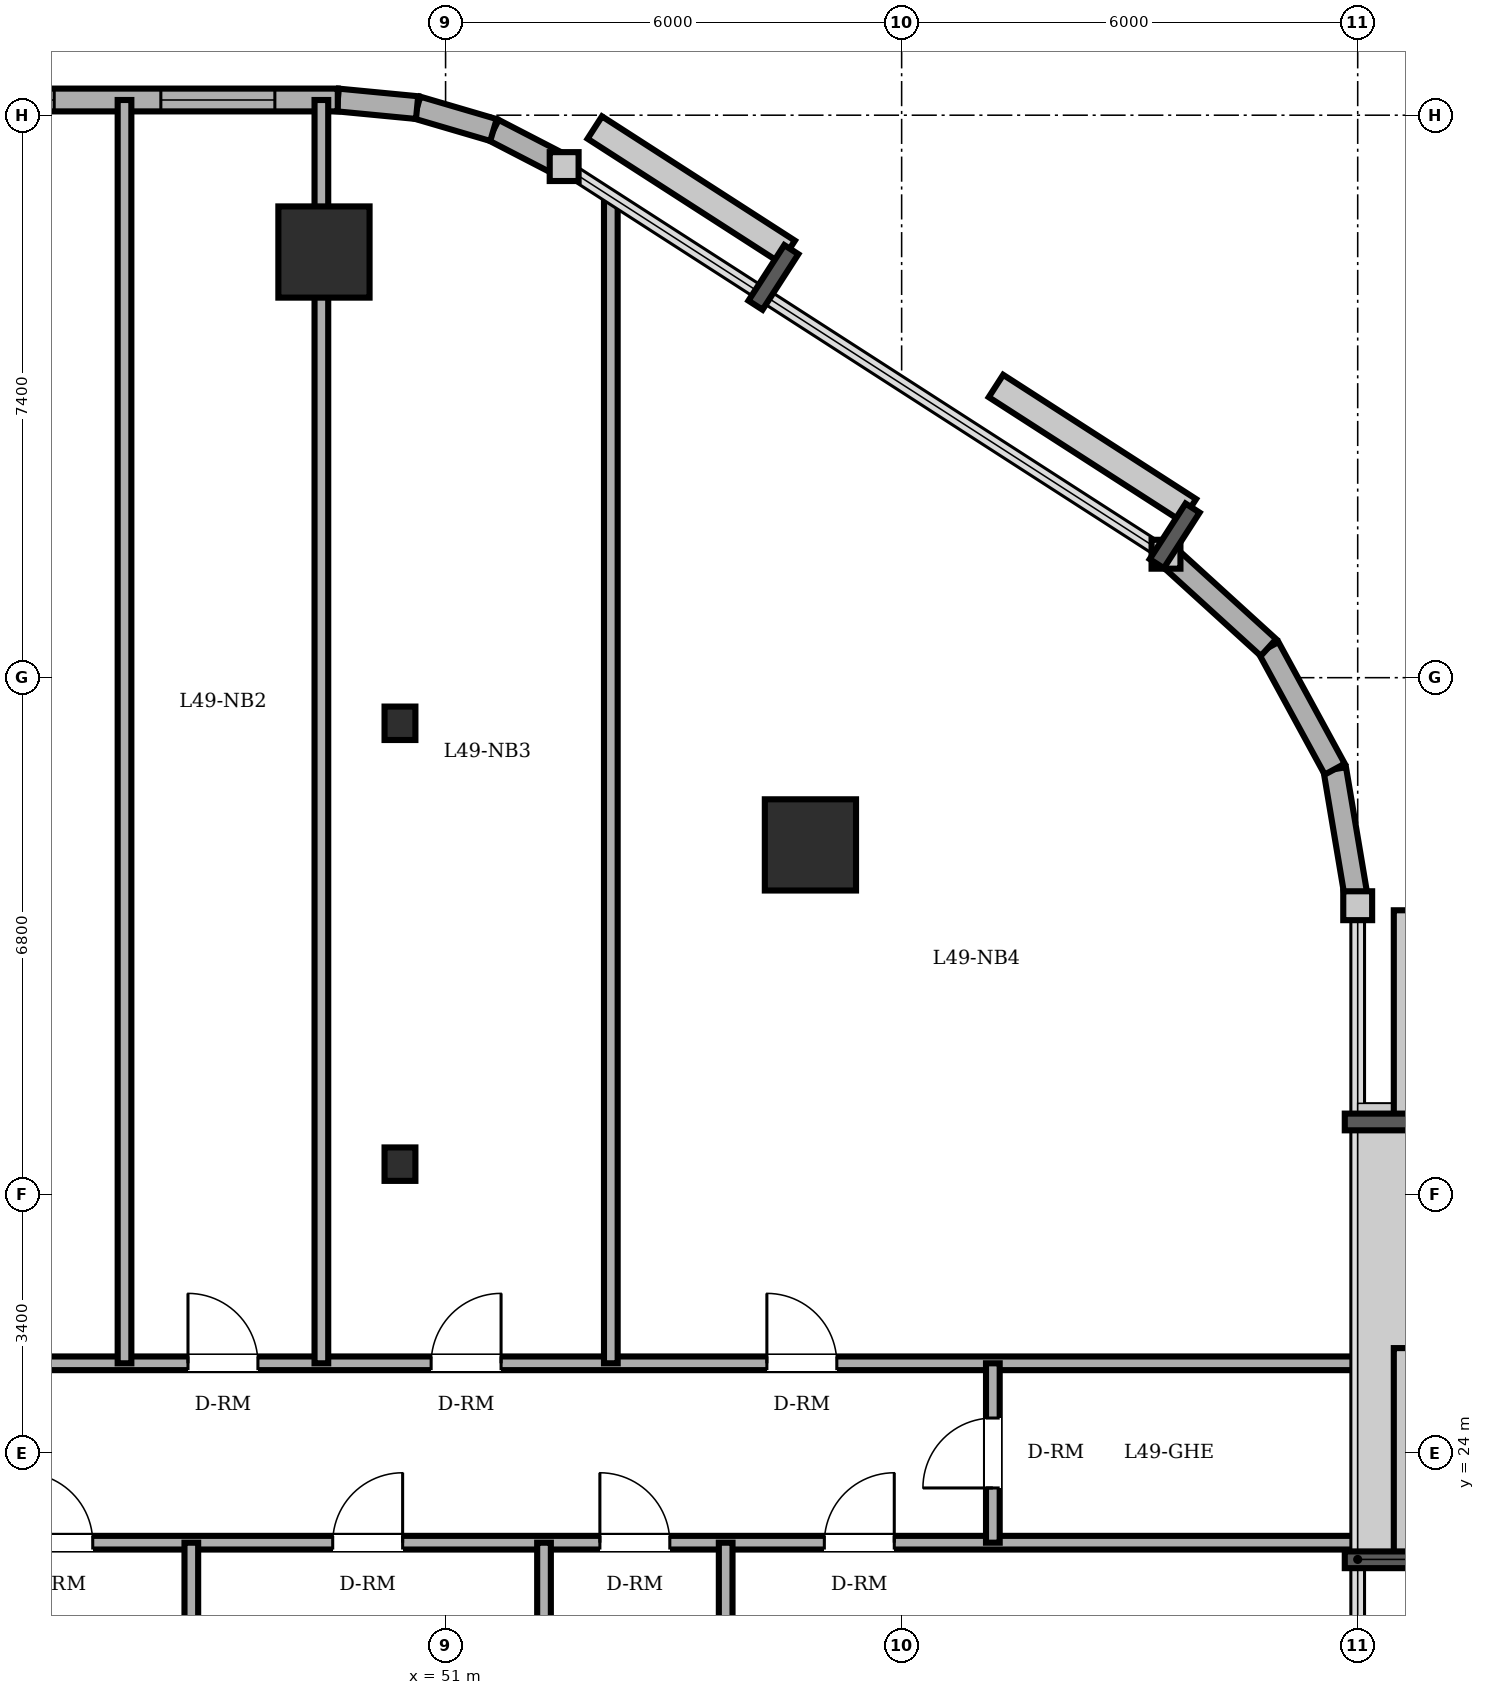
"""IFC4 building model, lengths in metres.
Left out: names, types, materials, properties, quantities, classifications, styles, units other than length and angle.
Written with IfcOpenShell. Run it as: python <this file> out.ifc"""

import sys

from ifc_helpers import new_model, si_unit, direction, frame, frame_2d, origin, origin_2d, place, context, subcontext, project, spatial, rectangle, circle, i_section, extrude, element, fill, save


model = new_model("IFC4")
c1 = context("Model", 3, precision=1e-05, world=origin(), true_north=direction((0.0, 1.0)))
c2 = subcontext(c1, "Body", "Model", "MODEL_VIEW")
j1 = project(units=[si_unit("LENGTHUNIT", "METRE"), si_unit("PLANEANGLEUNIT", "RADIAN")], contexts=[c1])
p1 = place(None, origin())
s1 = spatial("IfcSite", under=j1, at=p1, CompositionType="ELEMENT")
p2 = place(p1, origin())
s2 = spatial("IfcBuilding", under=s1, at=p2, CompositionType="ELEMENT")
p3 = place(p2, frame((0.0, 0.0, 187.0)))
s3 = spatial("IfcBuildingStorey", under=s2, at=p3, CompositionType="ELEMENT", Elevation=187.0)
for number, where, z_axis, x_axis in (
    (1, (55.8, 32.0, 0.0), (0.0, 0.0, 1.0), (1.0, 0.0, 0.0)),
    (2, (49.4, 39.8, 0.0), (0.0, 0.0, 1.0), (1.0, 0.0, 0.0)),
):
    element("IfcColumn", number, at=place(p3, frame(where, z_axis=z_axis, x_axis=x_axis)), inside=s3, PredefinedType="COLUMN", context=c2, shape_type="SweptSolid", body=[
        extrude(circle(Radius=0.6, at=origin_2d()), origin(), (0.0, 0.0, 1.0), 3.6),
    ])
for number, where, z_axis, x_axis in (
    (3, (50.4, 27.8, 0.0), (0.0, 0.0, 1.0), (1.0, 0.0, 0.0)),
    (4, (50.4, 33.6, 0.0), (0.0, 0.0, 1.0), (1.0, 0.0, 0.0)),
):
    element("IfcColumn", number, at=place(p3, frame(where, z_axis=z_axis, x_axis=x_axis)), inside=s3, PredefinedType="COLUMN", context=c2, shape_type="SweptSolid", body=[
        extrude(i_section(OverallWidth=0.406, OverallDepth=0.44, WebThickness=0.024, FlangeThickness=0.039, FilletRadius=0.015, at=origin_2d()), origin(), (0.0, 0.0, 1.0), 3.6),
    ])
p4 = place(p3, frame((63.0, 31.2, 0.0), z_axis=(0.0, 0.0, 1.0), x_axis=(-0.165724081207, 0.986172159873, 0.0)))
e5 = element("IfcWall", 5, at=p4, inside=s3, PredefinedType="SOLIDWALL", context=c2, shape_type="SweptSolid", body=[
    extrude(rectangle(XDim=1.822, YDim=0.3, at=frame_2d((0.911, 0.0))), origin(), (0.0, 0.0, 1.0), 3.36),
])
p5 = place(p3, frame((62.698, 32.997, 0.0), z_axis=(0.0, 0.0, 1.0), x_axis=(-0.478608030646, 0.878028674362, 0.0)))
e6 = element("IfcWall", 6, at=p5, inside=s3, PredefinedType="SOLIDWALL", context=c2, shape_type="SweptSolid", body=[
    extrude(rectangle(XDim=1.822, YDim=0.3, at=frame_2d((0.911, 0.0))), origin(), (0.0, 0.0, 1.0), 3.36),
])
p6 = place(p3, frame((61.826, 34.597, 0.0), z_axis=(0.0, 0.0, 1.0), x_axis=(-0.73947929393, 0.673179302897, 0.0)))
e7 = element("IfcWall", 7, at=p6, inside=s3, PredefinedType="SOLIDWALL", context=c2, shape_type="SweptSolid", body=[
    extrude(rectangle(XDim=1.823, YDim=0.3, at=frame_2d((0.911, 0.0))), origin(), (0.0, 0.0, 1.0), 3.36),
])
p7 = place(p3, frame((52.56, 40.924, 0.0), z_axis=(0.0, 0.0, 1.0), x_axis=(-0.888283247196, 0.459296062198, 0.0)))
e8 = element("IfcWall", 8, at=p7, inside=s3, PredefinedType="SOLIDWALL", context=c2, shape_type="SweptSolid", body=[
    extrude(rectangle(XDim=1.047, YDim=0.3, at=frame_2d((0.523, 0.0))), origin(), (0.0, 0.0, 1.0), 3.36),
])
p8 = place(p3, frame((51.63, 41.405, 0.0), z_axis=(0.0, 0.0, 1.0), x_axis=(-0.959528674476, 0.281610942363, 0.0)))
e9 = element("IfcWall", 9, at=p8, inside=s3, PredefinedType="SOLIDWALL", context=c2, shape_type="SweptSolid", body=[
    extrude(rectangle(XDim=1.047, YDim=0.3, at=frame_2d((0.524, 0.0))), origin(), (0.0, 0.0, 1.0), 3.36),
])
p9 = place(p3, frame((50.625, 41.7, 0.0), z_axis=(0.0, 0.0, 1.0), x_axis=(-0.995426089968, 0.095534807324, 0.0)))
e10 = element("IfcWall", 10, at=p9, inside=s3, PredefinedType="SOLIDWALL", context=c2, shape_type="SweptSolid", body=[
    extrude(rectangle(XDim=1.048, YDim=0.3, at=frame_2d((0.524, 0.0))), origin(), (0.0, 0.0, 1.0), 3.36),
])
p10 = place(p3, frame((49.582, 41.8, 0.0), z_axis=(0.0, 0.0, 1.0), x_axis=(-1.0, 0.0, 0.0)))
e11 = element("IfcWall", 11, at=p10, inside=s3, PredefinedType="SOLIDWALL", context=c2, shape_type="SweptSolid", body=[
    extrude(rectangle(XDim=30.282, YDim=0.3, at=frame_2d((15.141, 0.0))), origin(), (0.0, 0.0, 1.0), 3.36),
])
p11 = place(p10, frame((15.707, 0.0, 0.0)))
e12 = element("IfcOpeningElement", 12, at=p11, cuts=e11, PredefinedType="OPENING", context=c2, shape_type="SweptSolid", body=[
    extrude(rectangle(XDim=0.95, YDim=2.2, at=frame_2d((0.475, 1.1))), frame((0.0, 0.16, 0.0), z_axis=(0.0, -1.0, 0.0), x_axis=(1.0, 0.0, 0.0)), (0.0, 0.0, 1.0), 0.32),
])
p12 = place(p10, frame((0.828, 0.0, 0.85)))
e13 = element("IfcOpeningElement", 13, at=p12, cuts=e11, PredefinedType="OPENING", context=c2, shape_type="SweptSolid", body=[
    extrude(rectangle(XDim=1.5, YDim=1.55, at=frame_2d((0.75, 0.775))), frame((0.0, 0.16, 0.0), z_axis=(0.0, -1.0, 0.0), x_axis=(1.0, 0.0, 0.0)), (0.0, 0.0, 1.0), 0.32),
])
p13 = place(p10, frame((3.731, 0.0, 0.85)))
e14 = element("IfcOpeningElement", 14, at=p13, cuts=e11, PredefinedType="OPENING", context=c2, shape_type="SweptSolid", body=[
    extrude(rectangle(XDim=1.5, YDim=1.55, at=frame_2d((0.75, 0.775))), frame((0.0, 0.16, 0.0), z_axis=(0.0, -1.0, 0.0), x_axis=(1.0, 0.0, 0.0)), (0.0, 0.0, 1.0), 0.32),
])
p14 = place(p10, frame((5.407, 0.0, 0.85)))
e15 = element("IfcOpeningElement", 15, at=p14, cuts=e11, PredefinedType="OPENING", context=c2, shape_type="SweptSolid", body=[
    extrude(rectangle(XDim=1.5, YDim=1.55, at=frame_2d((0.75, 0.775))), frame((0.0, 0.16, 0.0), z_axis=(0.0, -1.0, 0.0), x_axis=(1.0, 0.0, 0.0)), (0.0, 0.0, 1.0), 0.32),
])
p15 = place(p10, frame((10.399, 0.0, 0.85)))
e16 = element("IfcOpeningElement", 16, at=p15, cuts=e11, PredefinedType="OPENING", context=c2, shape_type="SweptSolid", body=[
    extrude(rectangle(XDim=1.5, YDim=1.55, at=frame_2d((0.75, 0.775))), frame((0.0, 0.16, 0.0), z_axis=(0.0, -1.0, 0.0), x_axis=(1.0, 0.0, 0.0)), (0.0, 0.0, 1.0), 0.32),
])
p16 = place(p10, frame((13.715, 0.0, 0.85)))
e17 = element("IfcOpeningElement", 17, at=p16, cuts=e11, PredefinedType="OPENING", context=c2, shape_type="SweptSolid", body=[
    extrude(rectangle(XDim=1.5, YDim=1.55, at=frame_2d((0.75, 0.775))), frame((0.0, 0.16, 0.0), z_axis=(0.0, -1.0, 0.0), x_axis=(1.0, 0.0, 0.0)), (0.0, 0.0, 1.0), 0.32),
])
p17 = place(p10, frame((18.932, 0.0, 0.85)))
e18 = element("IfcOpeningElement", 18, at=p17, cuts=e11, PredefinedType="OPENING", context=c2, shape_type="SweptSolid", body=[
    extrude(rectangle(XDim=1.5, YDim=1.55, at=frame_2d((0.75, 0.775))), frame((0.0, 0.16, 0.0), z_axis=(0.0, -1.0, 0.0), x_axis=(1.0, 0.0, 0.0)), (0.0, 0.0, 1.0), 0.32),
])
p18 = place(p10, frame((22.532, 0.0, 0.85)))
e19 = element("IfcOpeningElement", 19, at=p18, cuts=e11, PredefinedType="OPENING", context=c2, shape_type="SweptSolid", body=[
    extrude(rectangle(XDim=1.5, YDim=1.55, at=frame_2d((0.75, 0.775))), frame((0.0, 0.16, 0.0), z_axis=(0.0, -1.0, 0.0), x_axis=(1.0, 0.0, 0.0)), (0.0, 0.0, 1.0), 0.32),
])
p19 = place(p10, frame((25.882, 0.0, 0.85)))
e20 = element("IfcOpeningElement", 20, at=p19, cuts=e11, PredefinedType="OPENING", context=c2, shape_type="SweptSolid", body=[
    extrude(rectangle(XDim=1.5, YDim=1.55, at=frame_2d((0.75, 0.775))), frame((0.0, 0.16, 0.0), z_axis=(0.0, -1.0, 0.0), x_axis=(1.0, 0.0, 0.0)), (0.0, 0.0, 1.0), 0.32),
])
p20 = place(p10, frame((27.532, 0.0, 0.85)))
e21 = element("IfcOpeningElement", 21, at=p20, cuts=e11, PredefinedType="OPENING", context=c2, shape_type="SweptSolid", body=[
    extrude(rectangle(XDim=1.5, YDim=1.55, at=frame_2d((0.75, 0.775))), frame((0.0, 0.16, 0.0), z_axis=(0.0, -1.0, 0.0), x_axis=(1.0, 0.0, 0.0)), (0.0, 0.0, 1.0), 0.32),
])
p21 = place(p3, frame((41.75, 22.82, 0.0), z_axis=(0.0, 0.0, 1.0), x_axis=(1.0, 0.0, 0.0)))
e22 = element("IfcWall", 22, at=p21, inside=s3, PredefinedType="PARTITIONING", context=c2, shape_type="SweptSolid", body=[
    extrude(rectangle(XDim=21.25, YDim=0.18, at=frame_2d((10.625, 0.0))), origin(), (0.0, 0.0, 1.0), 3.36),
])
p22 = place(p21, frame((3.688, 0.0, 0.0)))
e23 = element("IfcOpeningElement", 23, at=p22, cuts=e22, PredefinedType="OPENING", context=c2, shape_type="SweptSolid", body=[
    extrude(rectangle(XDim=0.92, YDim=2.1, at=frame_2d((0.46, 1.05))), frame((0.0, 0.1, 0.0), z_axis=(0.0, -1.0, 0.0), x_axis=(1.0, 0.0, 0.0)), (0.0, 0.0, 1.0), 0.2),
])
p23 = place(p21, frame((7.765, 0.0, 0.0)))
e24 = element("IfcOpeningElement", 24, at=p23, cuts=e22, PredefinedType="OPENING", context=c2, shape_type="SweptSolid", body=[
    extrude(rectangle(XDim=0.92, YDim=2.1, at=frame_2d((0.46, 1.05))), frame((0.0, 0.1, 0.0), z_axis=(0.0, -1.0, 0.0), x_axis=(1.0, 0.0, 0.0)), (0.0, 0.0, 1.0), 0.2),
])
p24 = place(p21, frame((11.28, 0.0, 0.0)))
e25 = element("IfcOpeningElement", 25, at=p24, cuts=e22, PredefinedType="OPENING", context=c2, shape_type="SweptSolid", body=[
    extrude(rectangle(XDim=0.92, YDim=2.1, at=frame_2d((0.46, 1.05))), frame((0.0, 0.1, 0.0), z_axis=(0.0, -1.0, 0.0), x_axis=(1.0, 0.0, 0.0)), (0.0, 0.0, 1.0), 0.2),
])
p25 = place(p21, frame((14.233, 0.0, 0.0)))
e26 = element("IfcOpeningElement", 26, at=p25, cuts=e22, PredefinedType="OPENING", context=c2, shape_type="SweptSolid", body=[
    extrude(rectangle(XDim=0.92, YDim=2.1, at=frame_2d((0.46, 1.05))), frame((0.0, 0.1, 0.0), z_axis=(0.0, -1.0, 0.0), x_axis=(1.0, 0.0, 0.0)), (0.0, 0.0, 1.0), 0.2),
])
p26 = place(p3, frame((41.75, 25.18, 0.0), z_axis=(0.0, 0.0, 1.0), x_axis=(1.0, 0.0, 0.0)))
e27 = element("IfcWall", 27, at=p26, inside=s3, PredefinedType="PARTITIONING", context=c2, shape_type="SweptSolid", body=[
    extrude(rectangle(XDim=21.25, YDim=0.18, at=frame_2d((10.625, 0.0))), origin(), (0.0, 0.0, 1.0), 3.36),
])
p27 = place(p26, frame((5.861, 0.0, 0.0)))
e28 = element("IfcOpeningElement", 28, at=p27, cuts=e27, PredefinedType="OPENING", context=c2, shape_type="SweptSolid", body=[
    extrude(rectangle(XDim=0.92, YDim=2.1, at=frame_2d((0.46, 1.05))), frame((0.0, 0.1, 0.0), z_axis=(0.0, -1.0, 0.0), x_axis=(1.0, 0.0, 0.0)), (0.0, 0.0, 1.0), 0.2),
])
p28 = place(p26, frame((9.06, 0.0, 0.0)))
e29 = element("IfcOpeningElement", 29, at=p28, cuts=e27, PredefinedType="OPENING", context=c2, shape_type="SweptSolid", body=[
    extrude(rectangle(XDim=0.92, YDim=2.1, at=frame_2d((0.46, 1.05))), frame((0.0, 0.1, 0.0), z_axis=(0.0, -1.0, 0.0), x_axis=(1.0, 0.0, 0.0)), (0.0, 0.0, 1.0), 0.2),
])
p29 = place(p26, frame((13.477, 0.0, 0.0)))
e30 = element("IfcOpeningElement", 30, at=p29, cuts=e27, PredefinedType="OPENING", context=c2, shape_type="SweptSolid", body=[
    extrude(rectangle(XDim=0.92, YDim=2.1, at=frame_2d((0.46, 1.05))), frame((0.0, 0.1, 0.0), z_axis=(0.0, -1.0, 0.0), x_axis=(1.0, 0.0, 0.0)), (0.0, 0.0, 1.0), 0.2),
])
for number, where, z_axis, x_axis in (
    (31, (46.776, 25.18, 0.0), (0.0, 0.0, 1.0), (0.0, 1.0, 0.0)),
    (32, (47.655, 6.2, 0.0), (0.0, 0.0, 1.0), (0.0, 1.0, 0.0)),
):
    element("IfcWall", number, at=place(p3, frame(where, z_axis=z_axis, x_axis=x_axis)), inside=s3, PredefinedType="PARTITIONING", context=c2, shape_type="SweptSolid", body=[
        extrude(rectangle(XDim=16.62, YDim=0.18, at=frame_2d((8.31, 0.0))), origin(), (0.0, 0.0, 1.0), 3.36),
    ])
p30 = place(p3, frame((49.366, 25.18, 0.0), z_axis=(0.0, 0.0, 1.0), x_axis=(0.0, 1.0, 0.0)))
e33 = element("IfcWall", 33, at=p30, inside=s3, PredefinedType="PARTITIONING", context=c2, shape_type="SweptSolid", body=[
    extrude(rectangle(XDim=16.62, YDim=0.18, at=frame_2d((8.31, 0.0))), origin(), (0.0, 0.0, 1.0), 2.892),
])
p31 = place(p3, frame((52.295, 6.939, 0.0), z_axis=(0.0, 0.0, 1.0), x_axis=(0.0, 1.0, 0.0)))
e34 = element("IfcWall", 34, at=p31, inside=s3, PredefinedType="PARTITIONING", context=c2, shape_type="SweptSolid", body=[
    extrude(rectangle(XDim=15.881, YDim=0.18, at=frame_2d((7.94, 0.0))), origin(), (0.0, 0.0, 1.0), 3.36),
])
p32 = place(p3, frame((53.174, 25.18, 0.0), z_axis=(0.0, 0.0, 1.0), x_axis=(0.0, 1.0, 0.0)))
e35 = element("IfcWall", 35, at=p32, inside=s3, PredefinedType="PARTITIONING", context=c2, shape_type="SweptSolid", body=[
    extrude(rectangle(XDim=15.349, YDim=0.18, at=frame_2d((7.675, 0.0))), origin(), (0.0, 0.0, 1.0), 3.36),
])
p33 = place(p3, frame((54.685, 8.445, 0.0), z_axis=(0.0, 0.0, 1.0), x_axis=(0.0, 1.0, 0.0)))
e36 = element("IfcWall", 36, at=p33, inside=s3, PredefinedType="PARTITIONING", context=c2, shape_type="SweptSolid", body=[
    extrude(rectangle(XDim=14.375, YDim=0.18, at=frame_2d((7.188, 0.0))), origin(), (0.0, 0.0, 1.0), 3.36),
])
p34 = place(p3, frame((58.2, 22.82, 0.0), z_axis=(0.0, 0.0, 1.0), x_axis=(0.0, 1.0, 0.0)))
e37 = element("IfcWall", 37, at=p34, inside=s3, PredefinedType="PARTITIONING", context=c2, shape_type="SweptSolid", body=[
    extrude(rectangle(XDim=2.36, YDim=0.18, at=frame_2d((1.18, 0.0))), origin(), (0.0, 0.0, 1.0), 3.36),
])
p35 = place(p34, frame((0.72, 0.0, 0.0)))
e38 = element("IfcOpeningElement", 38, at=p35, cuts=e37, PredefinedType="OPENING", context=c2, shape_type="SweptSolid", body=[
    extrude(rectangle(XDim=0.92, YDim=2.1, at=frame_2d((0.46, 1.05))), frame((0.0, 0.1, 0.0), z_axis=(0.0, -1.0, 0.0), x_axis=(1.0, 0.0, 0.0)), (0.0, 0.0, 1.0), 0.2),
])
p36 = place(p12, origin())
e39 = element("IfcWindow", 39, at=p36, inside=s3, PartitioningType="DOUBLE_PANEL_VERTICAL", PredefinedType="WINDOW", context=c2, shape_type="SweptSolid", body=[
    extrude(rectangle(XDim=1.5, YDim=1.55, at=frame_2d((0.75, 0.775))), frame((0.0, 0.03, 0.0), z_axis=(0.0, -1.0, 0.0), x_axis=(1.0, 0.0, 0.0)), (0.0, 0.0, 1.0), 0.06),
])
fill(e13, e39)
p37 = place(p13, origin())
e40 = element("IfcWindow", 40, at=p37, inside=s3, PartitioningType="DOUBLE_PANEL_VERTICAL", PredefinedType="WINDOW", context=c2, shape_type="SweptSolid", body=[
    extrude(rectangle(XDim=1.5, YDim=1.55, at=frame_2d((0.75, 0.775))), frame((0.0, 0.03, 0.0), z_axis=(0.0, -1.0, 0.0), x_axis=(1.0, 0.0, 0.0)), (0.0, 0.0, 1.0), 0.06),
])
fill(e14, e40)
p38 = place(p27, origin())
e41 = element("IfcDoor", 41, at=p38, inside=s3, OperationType="SINGLE_SWING_LEFT", PredefinedType="DOOR", context=c2, shape_type="SweptSolid", body=[
    extrude(rectangle(XDim=0.92, YDim=2.1, at=frame_2d((0.46, 1.05))), frame((0.0, 0.025, 0.0), z_axis=(0.0, -1.0, 0.0), x_axis=(1.0, 0.0, 0.0)), (0.0, 0.0, 1.0), 0.05),
])
fill(e28, e41)
p39 = place(p28, origin())
e42 = element("IfcDoor", 42, at=p39, inside=s3, OperationType="SINGLE_SWING_RIGHT", PredefinedType="DOOR", context=c2, shape_type="SweptSolid", body=[
    extrude(rectangle(XDim=0.92, YDim=2.1, at=frame_2d((0.46, 1.05))), frame((0.0, 0.025, 0.0), z_axis=(0.0, -1.0, 0.0), x_axis=(1.0, 0.0, 0.0)), (0.0, 0.0, 1.0), 0.05),
])
fill(e29, e42)
p40 = place(p29, origin())
e43 = element("IfcDoor", 43, at=p40, inside=s3, OperationType="SINGLE_SWING_LEFT", PredefinedType="DOOR", context=c2, shape_type="SweptSolid", body=[
    extrude(rectangle(XDim=0.92, YDim=2.1, at=frame_2d((0.46, 1.05))), frame((0.0, 0.025, 0.0), z_axis=(0.0, -1.0, 0.0), x_axis=(1.0, 0.0, 0.0)), (0.0, 0.0, 1.0), 0.05),
])
fill(e30, e43)
p41 = place(p22, origin())
e44 = element("IfcDoor", 44, at=p41, inside=s3, OperationType="SINGLE_SWING_LEFT", PredefinedType="DOOR", context=c2, shape_type="SweptSolid", body=[
    extrude(rectangle(XDim=0.92, YDim=2.1, at=frame_2d((0.46, 1.05))), frame((0.0, 0.025, 0.0), z_axis=(0.0, -1.0, 0.0), x_axis=(1.0, 0.0, 0.0)), (0.0, 0.0, 1.0), 0.05),
])
fill(e23, e44)
p42 = place(p23, origin())
e45 = element("IfcDoor", 45, at=p42, inside=s3, OperationType="SINGLE_SWING_RIGHT", PredefinedType="DOOR", context=c2, shape_type="SweptSolid", body=[
    extrude(rectangle(XDim=0.92, YDim=2.1, at=frame_2d((0.46, 1.05))), frame((0.0, 0.025, 0.0), z_axis=(0.0, -1.0, 0.0), x_axis=(1.0, 0.0, 0.0)), (0.0, 0.0, 1.0), 0.05),
])
fill(e24, e45)
p43 = place(p24, origin())
e46 = element("IfcDoor", 46, at=p43, inside=s3, OperationType="SINGLE_SWING_LEFT", PredefinedType="DOOR", context=c2, shape_type="SweptSolid", body=[
    extrude(rectangle(XDim=0.92, YDim=2.1, at=frame_2d((0.46, 1.05))), frame((0.0, 0.025, 0.0), z_axis=(0.0, -1.0, 0.0), x_axis=(1.0, 0.0, 0.0)), (0.0, 0.0, 1.0), 0.05),
])
fill(e25, e46)
p44 = place(p25, origin())
e47 = element("IfcDoor", 47, at=p44, inside=s3, OperationType="SINGLE_SWING_RIGHT", PredefinedType="DOOR", context=c2, shape_type="SweptSolid", body=[
    extrude(rectangle(XDim=0.92, YDim=2.1, at=frame_2d((0.46, 1.05))), frame((0.0, 0.025, 0.0), z_axis=(0.0, -1.0, 0.0), x_axis=(1.0, 0.0, 0.0)), (0.0, 0.0, 1.0), 0.05),
])
fill(e26, e47)
p45 = place(p35, origin())
e48 = element("IfcDoor", 48, at=p45, inside=s3, OperationType="SINGLE_SWING_LEFT", PredefinedType="DOOR", context=c2, shape_type="SweptSolid", body=[
    extrude(rectangle(XDim=0.92, YDim=2.1, at=frame_2d((0.46, 1.05))), frame((0.0, 0.025, 0.0), z_axis=(0.0, -1.0, 0.0), x_axis=(1.0, 0.0, 0.0)), (0.0, 0.0, 1.0), 0.05),
])
fill(e38, e48)
save(model, sys.argv[1])
